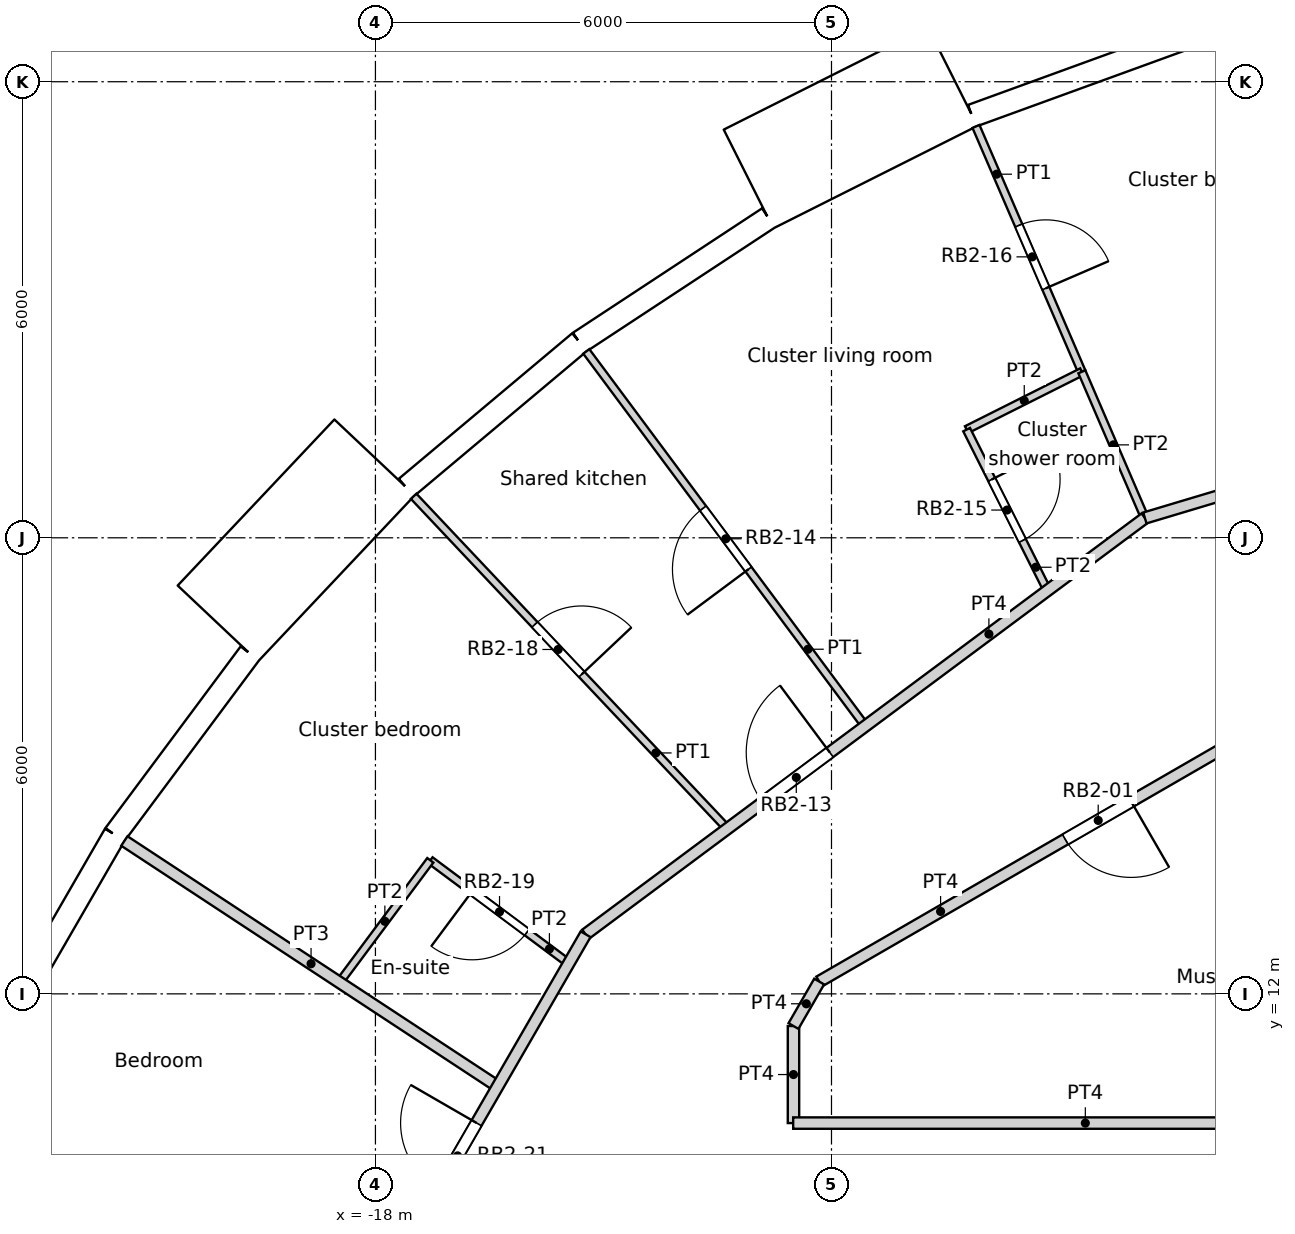
"""IFC4 building model, lengths in metres.
Left out: names, types, materials, properties, quantities, classifications, styles, units other than length and angle.
Written with IfcOpenShell. Run it as: python <this file> out.ifc"""

import sys

from ifc_helpers import new_model, si_unit, direction, frame, frame_2d, origin, origin_2d, place, context, subcontext, project, spatial, rectangle, circle, extrude, element, fill, save


model = new_model("IFC4")
c1 = context("Model", 3, precision=1e-05, world=origin(), true_north=direction((0.0, 1.0)))
c2 = subcontext(c1, "Body", "Model", "MODEL_VIEW")
j1 = project(units=[si_unit("LENGTHUNIT", "METRE"), si_unit("PLANEANGLEUNIT", "RADIAN")], contexts=[c1])
p1 = place(None, origin())
s1 = spatial("IfcSite", under=j1, at=p1, CompositionType="ELEMENT")
p2 = place(p1, origin())
s2 = spatial("IfcBuilding", under=s1, at=p2, CompositionType="ELEMENT")
p3 = place(p2, frame((0.0, 0.0, 136.8)))
s3 = spatial("IfcBuildingStorey", under=s2, at=p3, CompositionType="ELEMENT", Elevation=136.8)
for number, where, z_axis, x_axis in (
    (1, (-7.04, 23.516, 0.0), (0.0, 0.0, 1.0), (1.0, 0.0, 0.0)),
    (2, (-12.274, 21.259, 0.0), (0.0, 0.0, 1.0), (1.0, 0.0, 0.0)),
    (3, (-16.846, 17.855, 0.0), (0.0, 0.0, 1.0), (1.0, 0.0, 0.0)),
    (4, (-20.509, 13.489, 0.0), (0.0, 0.0, 1.0), (1.0, 0.0, 0.0)),
):
    element("IfcColumn", number, at=place(p3, frame(where, z_axis=z_axis, x_axis=x_axis)), inside=s3, PredefinedType="COLUMN", context=c2, shape_type="SweptSolid", body=[
        extrude(circle(Radius=0.6, at=origin_2d()), origin(), (0.0, 0.0, 1.0), 3.6),
    ])
for number, where, z_axis, x_axis in (
    (5, (-9.411, 16.301, 0.0), (0.0, 0.0, 1.0), (1.0, 0.0, 0.0)),
    (6, (-13.798, 12.802, 0.0), (0.0, 0.0, 1.0), (1.0, 0.0, 0.0)),
):
    element("IfcColumn", number, at=place(p3, frame(where, z_axis=z_axis, x_axis=x_axis)), inside=s3, PredefinedType="COLUMN", context=c2, shape_type="SweptSolid", body=[
        extrude(circle(Radius=0.65, at=origin_2d()), origin(), (0.0, 0.0, 1.0), 3.6),
    ])
p4 = place(p3, frame((-7.356, 24.57, 0.0), z_axis=(0.0, 0.0, 1.0), x_axis=(-0.939690282133, -0.342026568652, 0.0)))
e7 = element("IfcWall", 7, at=p4, inside=s3, PredefinedType="SOLIDWALL", context=c2, shape_type="SweptSolid", body=[
    extrude(rectangle(XDim=2.973, YDim=0.3, at=frame_2d((1.486, 0.0))), origin(), (0.0, 0.0, 1.0), 3.3),
])
p5 = place(p4, frame((1.486, 0.0, 1.55)))
e8 = element("IfcOpeningElement", 8, at=p5, cuts=e7, PredefinedType="OPENING", context=c2, shape_type="SweptSolid", body=[
    extrude(circle(Radius=0.9, at=origin_2d()), frame((0.0, 0.16, 0.0), z_axis=(0.0, -1.0, 0.0), x_axis=(1.0, 0.0, 0.0)), (0.0, 0.0, 1.0), 0.32),
])
p6 = place(p3, frame((-10.409, 24.068, -0.3), z_axis=(0.0, 0.0, 1.0), x_axis=(-0.893628249713, -0.448807922518, 0.0)))
e9 = element("IfcWall", 9, at=p6, inside=s3, PredefinedType="ELEMENTEDWALL", context=c2, shape_type="SweptSolid", body=[
    extrude(rectangle(XDim=3.0, YDim=1.45, at=frame_2d((1.5, 0.0))), origin(), (0.0, 0.0, 1.0), 3.6),
])
p7 = place(p6, frame((1.5, 0.0, 1.85)))
e10 = element("IfcOpeningElement", 10, at=p7, cuts=e9, PredefinedType="OPENING", context=c2, shape_type="SweptSolid", body=[
    extrude(circle(Radius=0.9, at=origin_2d()), frame((0.0, 0.735, 0.0), z_axis=(0.0, -1.0, 0.0), x_axis=(1.0, 0.0, 0.0)), (0.0, 0.0, 1.0), 1.47),
])
p8 = place(p3, frame((-12.832, 22.206, 0.0), z_axis=(0.0, 0.0, 1.0), x_axis=(-0.835508361394, -0.54947773207, 0.0)))
e11 = element("IfcWall", 11, at=p8, inside=s3, PredefinedType="SOLIDWALL", context=c2, shape_type="SweptSolid", body=[
    extrude(rectangle(XDim=2.973, YDim=0.3, at=frame_2d((1.486, 0.0))), origin(), (0.0, 0.0, 1.0), 2.8),
])
p9 = place(p8, frame((1.486, 0.0, 1.55)))
e12 = element("IfcOpeningElement", 12, at=p9, cuts=e11, PredefinedType="OPENING", context=c2, shape_type="SweptSolid", body=[
    extrude(circle(Radius=0.9, at=origin_2d()), frame((0.0, 0.16, 0.0), z_axis=(0.0, -1.0, 0.0), x_axis=(1.0, 0.0, 0.0)), (0.0, 0.0, 1.0), 0.32),
])
p10 = place(p3, frame((-15.316, 20.573, 0.0), z_axis=(0.0, 0.0, 1.0), x_axis=(-0.766008913364, -0.642829950023, 0.0)))
e13 = element("IfcWall", 13, at=p10, inside=s3, PredefinedType="SOLIDWALL", context=c2, shape_type="SweptSolid", body=[
    extrude(rectangle(XDim=2.973, YDim=0.3, at=frame_2d((1.486, 0.0))), origin(), (0.0, 0.0, 1.0), 3.3),
])
p11 = place(p10, frame((1.486, 0.0, 1.55)))
e14 = element("IfcOpeningElement", 14, at=p11, cuts=e13, PredefinedType="OPENING", context=c2, shape_type="SweptSolid", body=[
    extrude(circle(Radius=0.9, at=origin_2d()), frame((0.0, 0.16, 0.0), z_axis=(0.0, -1.0, 0.0), x_axis=(1.0, 0.0, 0.0)), (0.0, 0.0, 1.0), 0.32),
])
p12 = place(p3, frame((-18.013, 19.056, -0.3), z_axis=(0.0, 0.0, 1.0), x_axis=(-0.686217177108, -0.727396718334, 0.0)))
e15 = element("IfcWall", 15, at=p12, inside=s3, PredefinedType="ELEMENTEDWALL", context=c2, shape_type="SweptSolid", body=[
    extrude(rectangle(XDim=3.0, YDim=1.45, at=frame_2d((1.5, 0.0))), origin(), (0.0, 0.0, 1.0), 3.6),
])
p13 = place(p12, frame((1.5, 0.0, 1.85)))
e16 = element("IfcOpeningElement", 16, at=p13, cuts=e15, PredefinedType="OPENING", context=c2, shape_type="SweptSolid", body=[
    extrude(circle(Radius=0.9, at=origin_2d()), frame((0.0, 0.735, 0.0), z_axis=(0.0, -1.0, 0.0), x_axis=(1.0, 0.0, 0.0)), (0.0, 0.0, 1.0), 1.47),
])
p14 = place(p3, frame((-19.653, 16.478, 0.0), z_axis=(0.0, 0.0, 1.0), x_axis=(-0.597197580538, -0.80209416517, 0.0)))
e17 = element("IfcWall", 17, at=p14, inside=s3, PredefinedType="SOLIDWALL", context=c2, shape_type="SweptSolid", body=[
    extrude(rectangle(XDim=2.973, YDim=0.3, at=frame_2d((1.486, 0.0))), origin(), (0.0, 0.0, 1.0), 2.8),
])
p15 = place(p14, frame((1.486, 0.0, 1.55)))
e18 = element("IfcOpeningElement", 18, at=p15, cuts=e17, PredefinedType="OPENING", context=c2, shape_type="SweptSolid", body=[
    extrude(circle(Radius=0.9, at=origin_2d()), frame((0.0, 0.16, 0.0), z_axis=(0.0, -1.0, 0.0), x_axis=(1.0, 0.0, 0.0)), (0.0, 0.0, 1.0), 0.32),
])
p16 = place(p3, frame((-21.428, 14.094, 0.0), z_axis=(0.0, 0.0, 1.0), x_axis=(-0.499954672104, -0.866051572276, 0.0)))
e19 = element("IfcWall", 19, at=p16, inside=s3, PredefinedType="SOLIDWALL", context=c2, shape_type="SweptSolid", body=[
    extrude(rectangle(XDim=2.973, YDim=0.3, at=frame_2d((1.486, 0.0))), origin(), (0.0, 0.0, 1.0), 3.3),
])
p17 = place(p16, frame((1.486, 0.0, 1.55)))
e20 = element("IfcOpeningElement", 20, at=p17, cuts=e19, PredefinedType="OPENING", context=c2, shape_type="SweptSolid", body=[
    extrude(circle(Radius=0.9, at=origin_2d()), frame((0.0, 0.16, 0.0), z_axis=(0.0, -1.0, 0.0), x_axis=(1.0, 0.0, 0.0)), (0.0, 0.0, 1.0), 0.32),
])
p18 = place(p3, frame((-12.504, 10.3, 0.0), z_axis=(0.0, 0.0, 1.0), x_axis=(1.0, 0.0, 0.0)))
e21 = element("IfcWall", 21, at=p18, inside=s3, PredefinedType="PARTITIONING", context=c2, shape_type="SweptSolid", body=[
    extrude(rectangle(XDim=7.687, YDim=0.15, at=frame_2d((3.844, 0.0))), origin(), (0.0, 0.0, 1.0), 3.3),
])
p19 = place(p3, frame((-12.162, 12.162, 0.0), z_axis=(0.0, 0.0, 1.0), x_axis=(0.866004766557, 0.500035743023, 0.0)))
e22 = element("IfcWall", 22, at=p19, inside=s3, PredefinedType="PARTITIONING", context=c2, shape_type="SweptSolid", body=[
    extrude(rectangle(XDim=8.477, YDim=0.15, at=frame_2d((4.239, 0.0))), origin(), (0.0, 0.0, 1.0), 3.3),
])
p20 = place(p19, frame((3.739, 0.0, 0.0)))
e23 = element("IfcOpeningElement", 23, at=p20, cuts=e22, PredefinedType="OPENING", context=c2, shape_type="SweptSolid", body=[
    extrude(rectangle(XDim=1.0, YDim=2.04, at=frame_2d((0.5, 1.02))), frame((0.0, 0.075, 0.0), z_axis=(0.0, -1.0, 0.0), x_axis=(1.0, 0.0, 0.0)), (0.0, 0.0, 1.0), 0.15),
])
p21 = place(p3, frame((-15.235, 12.784, 0.0), z_axis=(0.0, 0.0, 1.0), x_axis=(0.802226995744, 0.597019134785, 0.0)))
e24 = element("IfcWall", 24, at=p21, inside=s3, PredefinedType="PARTITIONING", context=c2, shape_type="SweptSolid", body=[
    extrude(rectangle(XDim=9.173, YDim=0.15, at=frame_2d((4.586, 0.0))), origin(), (0.0, 0.0, 1.0), 3.3),
])
p22 = place(p21, frame((2.906, 0.0, 0.0)))
e25 = element("IfcOpeningElement", 25, at=p22, cuts=e24, PredefinedType="OPENING", context=c2, shape_type="SweptSolid", body=[
    extrude(rectangle(XDim=1.1, YDim=2.1, at=frame_2d((0.55, 1.05))), frame((0.0, 0.075, 0.0), z_axis=(0.0, -1.0, 0.0), x_axis=(1.0, 0.0, 0.0)), (0.0, 0.0, 1.0), 0.15),
])
p23 = place(p3, frame((-7.877, 18.261, 0.0), z_axis=(0.0, 0.0, 1.0), x_axis=(0.95799054752, 0.286799774863, 0.0)))
e26 = element("IfcWall", 26, at=p23, inside=s3, PredefinedType="PARTITIONING", context=c2, shape_type="SweptSolid", body=[
    extrude(rectangle(XDim=4.618, YDim=0.15, at=frame_2d((2.309, 0.0))), origin(), (0.0, 0.0, 1.0), 3.3),
])
p24 = place(p3, frame((-12.5, 11.577, 0.0), z_axis=(0.0, 0.0, 1.0), x_axis=(0.500024767483, 0.866011103799, 0.0)))
e27 = element("IfcWall", 27, at=p24, inside=s3, PredefinedType="PARTITIONING", context=c2, shape_type="SweptSolid", body=[
    extrude(rectangle(XDim=0.676, YDim=0.15, at=frame_2d((0.338, 0.0))), origin(), (0.0, 0.0, 1.0), 3.3),
])
p25 = place(p3, frame((-12.5, 10.3, 0.0), z_axis=(0.0, 0.0, 1.0), x_axis=(0.0, 1.0, 0.0)))
e28 = element("IfcWall", 28, at=p25, inside=s3, PredefinedType="PARTITIONING", context=c2, shape_type="SweptSolid", body=[
    extrude(rectangle(XDim=1.277, YDim=0.15, at=frame_2d((0.638, 0.0))), origin(), (0.0, 0.0, 1.0), 3.3),
])
p26 = place(p3, frame((-18.69, 6.803, 0.0), z_axis=(0.0, 0.0, 1.0), x_axis=(0.500229307554, 0.865892972523, 0.0)))
e29 = element("IfcWall", 29, at=p26, inside=s3, PredefinedType="PARTITIONING", context=c2, shape_type="SweptSolid", body=[
    extrude(rectangle(XDim=6.907, YDim=0.15, at=frame_2d((3.454, 0.0))), origin(), (0.0, 0.0, 1.0), 3.3),
])
p27 = place(p26, frame((3.04, 0.0, 0.0)))
e30 = element("IfcOpeningElement", 30, at=p27, cuts=e29, PredefinedType="OPENING", context=c2, shape_type="SweptSolid", body=[
    extrude(rectangle(XDim=1.0, YDim=2.1, at=frame_2d((0.5, 1.05))), frame((0.0, 0.075, 0.0), z_axis=(0.0, -1.0, 0.0), x_axis=(1.0, 0.0, 0.0)), (0.0, 0.0, 1.0), 0.15),
])
p28 = place(p3, frame((-15.226, 20.452, 0.0), z_axis=(0.0, 0.0, 1.0), x_axis=(0.597155230642, -0.802125694961, 0.0)))
e31 = element("IfcWall", 31, at=p28, inside=s3, PredefinedType="PARTITIONING", context=c2, shape_type="SweptSolid", body=[
    extrude(rectangle(XDim=6.146, YDim=0.1, at=frame_2d((3.073, 0.0))), origin(), (0.0, 0.0, 1.0), 3.3),
])
p29 = place(p28, frame((2.573, 0.0, 0.0)))
e32 = element("IfcOpeningElement", 32, at=p29, cuts=e31, PredefinedType="OPENING", context=c2, shape_type="SweptSolid", body=[
    extrude(rectangle(XDim=1.0, YDim=2.04, at=frame_2d((0.5, 1.02))), frame((0.0, 0.05, 0.0), z_axis=(0.0, -1.0, 0.0), x_axis=(1.0, 0.0, 0.0)), (0.0, 0.0, 1.0), 0.1),
])
p30 = place(p3, frame((-10.222, 19.423, 0.0), z_axis=(0.0, 0.0, 1.0), x_axis=(0.893706346613, 0.448652388854, 0.0)))
e33 = element("IfcWall", 33, at=p30, inside=s3, PredefinedType="PARTITIONING", context=c2, shape_type="SweptSolid", body=[
    extrude(rectangle(XDim=1.696, YDim=0.1, at=frame_2d((0.848, 0.0))), origin(), (0.0, 0.0, 1.0), 3.3),
])
p31 = place(p3, frame((-10.222, 19.423, 0.0), z_axis=(0.0, 0.0, 1.0), x_axis=(0.448862306063, -0.893600934532, 0.0)))
e34 = element("IfcWall", 34, at=p31, inside=s3, PredefinedType="PARTITIONING", context=c2, shape_type="SweptSolid", body=[
    extrude(rectangle(XDim=2.368, YDim=0.1, at=frame_2d((1.184, 0.0))), origin(), (0.0, 0.0, 1.0), 3.3),
])
p32 = place(p31, frame((0.734, 0.0, 0.0)))
e35 = element("IfcOpeningElement", 35, at=p32, cuts=e34, PredefinedType="OPENING", context=c2, shape_type="SweptSolid", body=[
    extrude(rectangle(XDim=0.9, YDim=2.0, at=frame_2d((0.45, 1.0))), frame((0.0, 0.05, 0.0), z_axis=(0.0, -1.0, 0.0), x_axis=(1.0, 0.0, 0.0)), (0.0, 0.0, 1.0), 0.1),
])
p33 = place(p3, frame((-10.099, 23.412, 0.0), z_axis=(0.0, 0.0, 1.0), x_axis=(0.396231159595, -0.918150787271, 0.0)))
e36 = element("IfcWall", 36, at=p33, inside=s3, PredefinedType="PARTITIONING", context=c2, shape_type="SweptSolid", body=[
    extrude(rectangle(XDim=3.516, YDim=0.1, at=frame_2d((1.758, 0.0))), origin(), (0.0, 0.0, 1.0), 3.3),
])
p34 = place(p33, frame((1.419, 0.0, 0.0)))
e37 = element("IfcOpeningElement", 37, at=p34, cuts=e36, PredefinedType="OPENING", context=c2, shape_type="SweptSolid", body=[
    extrude(rectangle(XDim=0.9, YDim=2.1, at=frame_2d((0.45, 1.05))), frame((0.0, 0.05, 0.0), z_axis=(0.0, -1.0, 0.0), x_axis=(1.0, 0.0, 0.0)), (0.0, 0.0, 1.0), 0.1),
])
p35 = place(p3, frame((-17.497, 18.546, 0.0), z_axis=(0.0, 0.0, 1.0), x_axis=(0.68628608304, -0.72733170715, 0.0)))
e38 = element("IfcWall", 38, at=p35, inside=s3, PredefinedType="PARTITIONING", context=c2, shape_type="SweptSolid", body=[
    extrude(rectangle(XDim=6.013, YDim=0.1, at=frame_2d((3.007, 0.0))), origin(), (0.0, 0.0, 1.0), 3.3),
])
p36 = place(p35, frame((2.321, 0.0, 0.0)))
e39 = element("IfcOpeningElement", 39, at=p36, cuts=e38, PredefinedType="OPENING", context=c2, shape_type="SweptSolid", body=[
    extrude(rectangle(XDim=0.9, YDim=2.1, at=frame_2d((0.45, 1.05))), frame((0.0, 0.05, 0.0), z_axis=(0.0, -1.0, 0.0), x_axis=(1.0, 0.0, 0.0)), (0.0, 0.0, 1.0), 0.1),
])
p37 = place(p3, frame((-8.706, 20.184, 0.0), z_axis=(0.0, 0.0, 1.0), x_axis=(0.395902233763, -0.918292666475, 0.0)))
e40 = element("IfcWall", 40, at=p37, inside=s3, PredefinedType="PARTITIONING", context=c2, shape_type="SweptSolid", body=[
    extrude(rectangle(XDim=2.094, YDim=0.1, at=frame_2d((1.047, 0.0))), origin(), (0.0, 0.0, 1.0), 3.3),
])
p38 = place(p3, frame((-17.278, 13.757, 0.0), z_axis=(0.0, 0.0, 1.0), x_axis=(0.802174554185, -0.597089595135, 0.0)))
e41 = element("IfcWall", 41, at=p38, inside=s3, PredefinedType="PARTITIONING", context=c2, shape_type="SweptSolid", body=[
    extrude(rectangle(XDim=2.271, YDim=0.1, at=frame_2d((1.136, 0.0))), origin(), (0.0, 0.0, 1.0), 3.3),
])
p39 = place(p38, frame((0.685, 0.0, 0.0)))
e42 = element("IfcOpeningElement", 42, at=p39, cuts=e41, PredefinedType="OPENING", context=c2, shape_type="SweptSolid", body=[
    extrude(rectangle(XDim=0.9, YDim=2.04, at=frame_2d((0.45, 1.02))), frame((0.0, 0.05, 0.0), z_axis=(0.0, -1.0, 0.0), x_axis=(1.0, 0.0, 0.0)), (0.0, 0.0, 1.0), 0.1),
])
p40 = place(p3, frame((-18.474, 12.151, 0.0), z_axis=(0.0, 0.0, 1.0), x_axis=(0.597246123016, 0.802058020683, 0.0)))
e43 = element("IfcWall", 43, at=p40, inside=s3, PredefinedType="PARTITIONING", context=c2, shape_type="SweptSolid", body=[
    extrude(rectangle(XDim=2.003, YDim=0.1, at=frame_2d((1.001, 0.0))), origin(), (0.0, 0.0, 1.0), 3.3),
])
p41 = place(p3, frame((-21.303, 14.011, 0.0), z_axis=(0.0, 0.0, 1.0), x_axis=(0.835566588395, -0.549389184785, 0.0)))
e44 = element("IfcWall", 44, at=p41, inside=s3, PredefinedType="PARTITIONING", context=c2, shape_type="SweptSolid", body=[
    extrude(rectangle(XDim=5.879, YDim=0.15, at=frame_2d((2.939, 0.0))), origin(), (0.0, 0.0, 1.0), 3.3),
])
p42 = place(p5, origin())
e45 = element("IfcWindow", 45, at=p42, inside=s3, PartitioningType="SINGLE_PANEL", PredefinedType="WINDOW", context=c2, shape_type="SweptSolid", body=[
    extrude(circle(Radius=0.9, at=origin_2d()), frame((0.0, 0.12, 0.0), z_axis=(0.0, -1.0, 0.0), x_axis=(1.0, 0.0, 0.0)), (0.0, 0.0, 1.0), 0.1),
])
fill(e8, e45)
p43 = place(p7, origin())
e46 = element("IfcWindow", 46, at=p43, inside=s3, PartitioningType="SINGLE_PANEL", PredefinedType="WINDOW", context=c2, shape_type="SweptSolid", body=[
    extrude(circle(Radius=0.9, at=origin_2d()), frame((0.0, 0.695, 0.0), z_axis=(0.0, -1.0, 0.0), x_axis=(1.0, 0.0, 0.0)), (0.0, 0.0, 1.0), 0.1),
])
fill(e10, e46)
p44 = place(p9, origin())
e47 = element("IfcWindow", 47, at=p44, inside=s3, PartitioningType="SINGLE_PANEL", PredefinedType="WINDOW", context=c2, shape_type="SweptSolid", body=[
    extrude(circle(Radius=0.9, at=origin_2d()), frame((0.0, 0.12, 0.0), z_axis=(0.0, -1.0, 0.0), x_axis=(1.0, 0.0, 0.0)), (0.0, 0.0, 1.0), 0.1),
])
fill(e12, e47)
p45 = place(p11, origin())
e48 = element("IfcWindow", 48, at=p45, inside=s3, PartitioningType="SINGLE_PANEL", PredefinedType="WINDOW", context=c2, shape_type="SweptSolid", body=[
    extrude(circle(Radius=0.9, at=origin_2d()), frame((0.0, 0.12, 0.0), z_axis=(0.0, -1.0, 0.0), x_axis=(1.0, 0.0, 0.0)), (0.0, 0.0, 1.0), 0.1),
])
fill(e14, e48)
p46 = place(p13, origin())
e49 = element("IfcWindow", 49, at=p46, inside=s3, PartitioningType="SINGLE_PANEL", PredefinedType="WINDOW", context=c2, shape_type="SweptSolid", body=[
    extrude(circle(Radius=0.9, at=origin_2d()), frame((0.0, 0.695, 0.0), z_axis=(0.0, -1.0, 0.0), x_axis=(1.0, 0.0, 0.0)), (0.0, 0.0, 1.0), 0.1),
])
fill(e16, e49)
p47 = place(p15, origin())
e50 = element("IfcWindow", 50, at=p47, inside=s3, PartitioningType="SINGLE_PANEL", PredefinedType="WINDOW", context=c2, shape_type="SweptSolid", body=[
    extrude(circle(Radius=0.9, at=origin_2d()), frame((0.0, 0.12, 0.0), z_axis=(0.0, -1.0, 0.0), x_axis=(1.0, 0.0, 0.0)), (0.0, 0.0, 1.0), 0.1),
])
fill(e18, e50)
p48 = place(p17, origin())
e51 = element("IfcWindow", 51, at=p48, inside=s3, PartitioningType="SINGLE_PANEL", PredefinedType="WINDOW", context=c2, shape_type="SweptSolid", body=[
    extrude(circle(Radius=0.9, at=origin_2d()), frame((0.0, 0.12, 0.0), z_axis=(0.0, -1.0, 0.0), x_axis=(1.0, 0.0, 0.0)), (0.0, 0.0, 1.0), 0.1),
])
fill(e20, e51)
p49 = place(p20, origin())
e52 = element("IfcDoor", 52, at=p49, inside=s3, OperationType="SINGLE_SWING_LEFT", PredefinedType="DOOR", context=c2, shape_type="SweptSolid", body=[
    extrude(rectangle(XDim=1.0, YDim=2.04, at=frame_2d((0.5, 1.02))), frame((0.0, 0.025, 0.0), z_axis=(0.0, -1.0, 0.0), x_axis=(1.0, 0.0, 0.0)), (0.0, 0.0, 1.0), 0.05),
])
fill(e23, e52)
p50 = place(p22, origin())
e53 = element("IfcDoor", 53, at=p50, inside=s3, OperationType="SINGLE_SWING_RIGHT", PredefinedType="DOOR", context=c2, shape_type="SweptSolid", body=[
    extrude(rectangle(XDim=1.1, YDim=2.1, at=frame_2d((0.55, 1.05))), frame((0.0, 0.025, 0.0), z_axis=(0.0, -1.0, 0.0), x_axis=(1.0, 0.0, 0.0)), (0.0, 0.0, 1.0), 0.05),
])
fill(e25, e53)
p51 = place(p29, origin())
e54 = element("IfcDoor", 54, at=p51, inside=s3, OperationType="SINGLE_SWING_LEFT", PredefinedType="DOOR", context=c2, shape_type="SweptSolid", body=[
    extrude(rectangle(XDim=1.0, YDim=2.04, at=frame_2d((0.5, 1.02))), frame((0.0, 0.025, 0.0), z_axis=(0.0, -1.0, 0.0), x_axis=(1.0, 0.0, 0.0)), (0.0, 0.0, 1.0), 0.05),
])
fill(e32, e54)
p52 = place(p32, origin())
e55 = element("IfcDoor", 55, at=p52, inside=s3, OperationType="SINGLE_SWING_LEFT", PredefinedType="DOOR", context=c2, shape_type="SweptSolid", body=[
    extrude(rectangle(XDim=0.9, YDim=2.0, at=frame_2d((0.45, 1.0))), frame((0.0, 0.025, 0.0), z_axis=(0.0, -1.0, 0.0), x_axis=(1.0, 0.0, 0.0)), (0.0, 0.0, 1.0), 0.05),
])
fill(e35, e55)
p53 = place(p34, origin())
e56 = element("IfcDoor", 56, at=p53, inside=s3, OperationType="SINGLE_SWING_RIGHT", PredefinedType="DOOR", context=c2, shape_type="SweptSolid", body=[
    extrude(rectangle(XDim=0.9, YDim=2.1, at=frame_2d((0.45, 1.05))), frame((0.0, 0.025, 0.0), z_axis=(0.0, -1.0, 0.0), x_axis=(1.0, 0.0, 0.0)), (0.0, 0.0, 1.0), 0.05),
])
fill(e37, e56)
p54 = place(p36, origin())
e57 = element("IfcDoor", 57, at=p54, inside=s3, OperationType="SINGLE_SWING_RIGHT", PredefinedType="DOOR", context=c2, shape_type="SweptSolid", body=[
    extrude(rectangle(XDim=0.9, YDim=2.1, at=frame_2d((0.45, 1.05))), frame((0.0, 0.025, 0.0), z_axis=(0.0, -1.0, 0.0), x_axis=(1.0, 0.0, 0.0)), (0.0, 0.0, 1.0), 0.05),
])
fill(e39, e57)
p55 = place(p39, origin())
e58 = element("IfcDoor", 58, at=p55, inside=s3, OperationType="SINGLE_SWING_RIGHT", PredefinedType="DOOR", context=c2, shape_type="SweptSolid", body=[
    extrude(rectangle(XDim=0.9, YDim=2.04, at=frame_2d((0.45, 1.02))), frame((0.0, 0.025, 0.0), z_axis=(0.0, -1.0, 0.0), x_axis=(1.0, 0.0, 0.0)), (0.0, 0.0, 1.0), 0.05),
])
fill(e42, e58)
p56 = place(p27, origin())
e59 = element("IfcDoor", 59, at=p56, inside=s3, OperationType="SINGLE_SWING_RIGHT", PredefinedType="DOOR", context=c2, shape_type="SweptSolid", body=[
    extrude(rectangle(XDim=1.0, YDim=2.1, at=frame_2d((0.5, 1.05))), frame((0.0, 0.025, 0.0), z_axis=(0.0, -1.0, 0.0), x_axis=(1.0, 0.0, 0.0)), (0.0, 0.0, 1.0), 0.05),
])
fill(e30, e59)
save(model, sys.argv[1])
